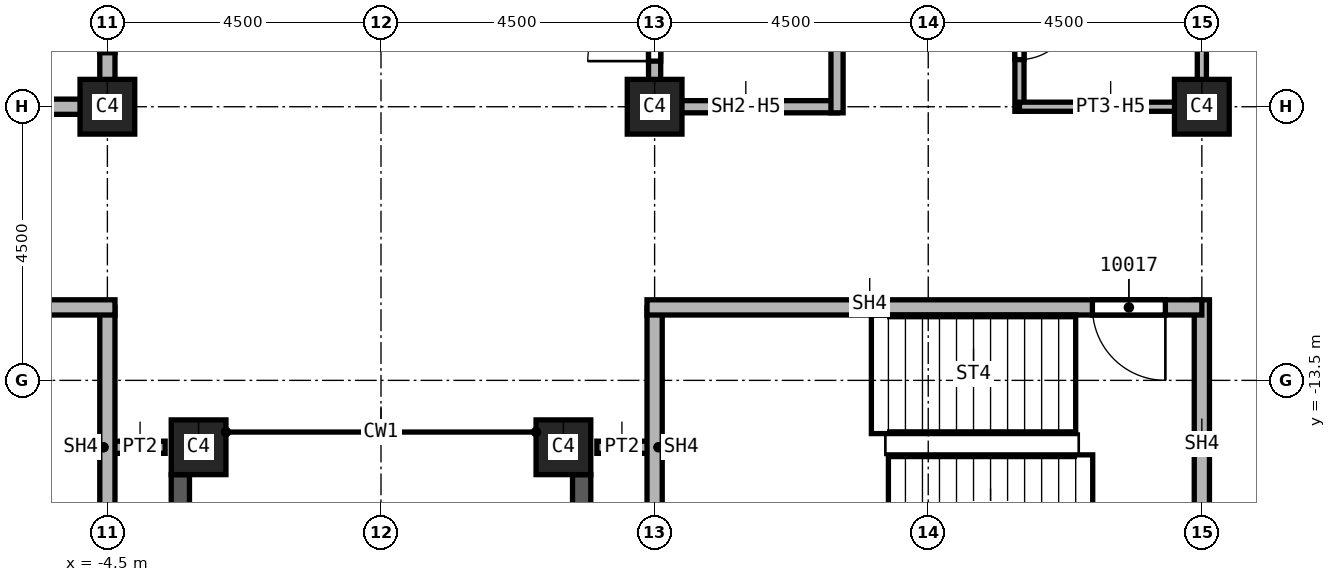
"""IFC4 building model, lengths in metres.
Left out: names, types, materials, properties, quantities, classifications, styles, units other than length and angle.
Written with IfcOpenShell. Run it as: python <this file> out.ifc"""

import sys

from ifc_helpers import new_model, si_unit, direction, frame, frame_2d, origin, origin_2d, place, context, subcontext, project, spatial, rectangle, extrude, element, fill, save


model = new_model("IFC4")
c1 = context("Model", 3, precision=1e-05, world=origin(), true_north=direction((0.0, 1.0)))
c2 = subcontext(c1, "Body", "Model", "MODEL_VIEW")
j1 = project(units=[si_unit("LENGTHUNIT", "METRE"), si_unit("PLANEANGLEUNIT", "RADIAN")], contexts=[c1])
p1 = place(None, origin())
s1 = spatial("IfcSite", under=j1, at=p1, CompositionType="ELEMENT")
p2 = place(p1, origin())
s2 = spatial("IfcBuilding", under=s1, at=p2, CompositionType="ELEMENT")
p3 = place(p2, frame((0.0, 0.0, 174.0)))
s3 = spatial("IfcBuildingStorey", under=s2, at=p3, CompositionType="ELEMENT", Elevation=174.0)
for number, where, z_axis, x_axis in (
    (1, (4.5, -9.0, 0.0), (0.0, 0.0, 1.0), (1.0, 0.0, 0.0)),
    (2, (13.5, -9.0, 0.0), (0.0, 0.0, 1.0), (1.0, 0.0, 0.0)),
    (3, (-4.5, -9.0, 0.0), (0.0, 0.0, 1.0), (1.0, 0.0, 0.0)),
    (4, (3.0, -14.6, 0.0), (0.0, 0.0, 1.0), (1.0, 0.0, 0.0)),
    (5, (-3.0, -14.6, 0.0), (0.0, 0.0, 1.0), (1.0, 0.0, 0.0)),
):
    element("IfcColumn", number, at=place(p3, frame(where, z_axis=z_axis, x_axis=x_axis)), inside=s3, PredefinedType="COLUMN", context=c2, shape_type="SweptSolid", body=[
        extrude(rectangle(XDim=0.9, YDim=0.9, at=origin_2d()), origin(), (0.0, 0.0, 1.0), 3.59),
    ])
p4 = place(p3, frame((-3.3, -23.05, 0.0), z_axis=(0.0, 0.0, 1.0), x_axis=(0.0, 1.0, 0.0)))
e6 = element("IfcWall", 6, at=p4, inside=s3, PredefinedType="SOLIDWALL", context=c2, shape_type="SweptSolid", body=[
    extrude(rectangle(XDim=8.0, YDim=0.3, at=frame_2d((4.0, 0.0))), origin(), (0.0, 0.0, 1.0), 2.99),
])
p5 = place(p4, frame((0.8, 0.0, 0.8)))
e7 = element("IfcOpeningElement", 7, at=p5, cuts=e6, PredefinedType="OPENING", context=c2, shape_type="SweptSolid", body=[
    extrude(rectangle(XDim=2.4, YDim=1.95, at=frame_2d((1.2, 0.975))), frame((0.0, 0.15, 0.0), z_axis=(0.0, -1.0, 0.0), x_axis=(1.0, 0.0, 0.0)), (0.0, 0.0, 1.0), 0.3),
])
p6 = place(p4, frame((4.8, 0.0, 0.8)))
e8 = element("IfcOpeningElement", 8, at=p6, cuts=e6, PredefinedType="OPENING", context=c2, shape_type="SweptSolid", body=[
    extrude(rectangle(XDim=2.4, YDim=1.95, at=frame_2d((1.2, 0.975))), frame((0.0, 0.15, 0.0), z_axis=(0.0, -1.0, 0.0), x_axis=(1.0, 0.0, 0.0)), (0.0, 0.0, 1.0), 0.3),
])
p7 = place(p3, frame((3.3, -15.05, 0.0), z_axis=(0.0, 0.0, 1.0), x_axis=(0.0, -1.0, 0.0)))
e9 = element("IfcWall", 9, at=p7, inside=s3, PredefinedType="SOLIDWALL", context=c2, shape_type="SweptSolid", body=[
    extrude(rectangle(XDim=8.0, YDim=0.3, at=frame_2d((4.0, 0.0))), origin(), (0.0, 0.0, 1.0), 2.99),
])
p8 = place(p7, frame((0.8, 0.0, 0.8)))
e10 = element("IfcOpeningElement", 10, at=p8, cuts=e9, PredefinedType="OPENING", context=c2, shape_type="SweptSolid", body=[
    extrude(rectangle(XDim=2.4, YDim=1.95, at=frame_2d((1.2, 0.975))), frame((0.0, 0.15, 0.0), z_axis=(0.0, -1.0, 0.0), x_axis=(1.0, 0.0, 0.0)), (0.0, 0.0, 1.0), 0.3),
])
p9 = place(p7, frame((4.8, 0.0, 0.8)))
e11 = element("IfcOpeningElement", 11, at=p9, cuts=e9, PredefinedType="OPENING", context=c2, shape_type="SweptSolid", body=[
    extrude(rectangle(XDim=2.4, YDim=1.95, at=frame_2d((1.2, 0.975))), frame((0.0, 0.15, 0.0), z_axis=(0.0, -1.0, 0.0), x_axis=(1.0, 0.0, 0.0)), (0.0, 0.0, 1.0), 0.3),
])
for number, where, z_axis, x_axis in (
    (12, (-3.55, -14.6, 0.0), (0.0, 0.0, 1.0), (-1.0, 0.0, 0.0)),
    (13, (4.5, -14.6, 0.0), (0.0, 0.0, 1.0), (-1.0, 0.0, 0.0)),
):
    element("IfcWall", number, at=place(p3, frame(where, z_axis=z_axis, x_axis=x_axis)), inside=s3, PredefinedType="PARTITIONING", context=c2, shape_type="SweptSolid", body=[
        extrude(rectangle(XDim=0.95, YDim=0.2, at=frame_2d((0.475, 0.0))), origin(), (0.0, 0.0, 1.0), 3.59),
    ])
p10 = place(p3, frame((4.5, -9.1, 0.0), z_axis=(0.0, 0.0, 1.0), x_axis=(0.0, 1.0, 0.0)))
e14 = element("IfcWall", 14, at=p10, inside=s3, PredefinedType="SOLIDWALL", context=c2, shape_type="SweptSolid", body=[
    extrude(rectangle(XDim=9.1, YDim=0.2, at=frame_2d((4.55, 0.0))), origin(), (0.0, 0.0, 1.0), 2.828),
])
p11 = place(p10, frame((0.85, 0.0, 0.0)))
e15 = element("IfcOpeningElement", 15, at=p11, cuts=e14, PredefinedType="OPENING", context=c2, shape_type="SweptSolid", body=[
    extrude(rectangle(XDim=1.1, YDim=2.1, at=frame_2d((0.55, 1.05))), frame((0.0, 0.1, 0.0), z_axis=(0.0, -1.0, 0.0), x_axis=(1.0, 0.0, 0.0)), (0.0, 0.0, 1.0), 0.2),
])
p12 = place(p10, frame((6.35, 0.0, 0.0)))
e16 = element("IfcOpeningElement", 16, at=p12, cuts=e14, PredefinedType="OPENING", context=c2, shape_type="SweptSolid", body=[
    extrude(rectangle(XDim=1.1, YDim=2.1, at=frame_2d((0.55, 1.05))), frame((0.0, 0.1, 0.0), z_axis=(0.0, -1.0, 0.0), x_axis=(1.0, 0.0, 0.0)), (0.0, 0.0, 1.0), 0.2),
])
p13 = place(p3, frame((7.5, -9.0, 0.0), z_axis=(0.0, 0.0, 1.0), x_axis=(-1.0, 0.0, 0.0)))
e17 = element("IfcWall", 17, at=p13, inside=s3, PredefinedType="SOLIDWALL", context=c2, shape_type="SweptSolid", body=[
    extrude(rectangle(XDim=3.0, YDim=0.2, at=frame_2d((1.5, 0.0))), origin(), (0.0, 0.0, 1.0), 2.828),
])
p14 = place(p3, frame((7.5, -2.875, 0.0), z_axis=(0.0, 0.0, 1.0), x_axis=(0.0, -1.0, 0.0)))
e18 = element("IfcWall", 18, at=p14, inside=s3, PredefinedType="SOLIDWALL", context=c2, shape_type="SweptSolid", body=[
    extrude(rectangle(XDim=6.225, YDim=0.2, at=frame_2d((3.113, 0.0))), origin(), (0.0, 0.0, 1.0), 3.59),
])
p15 = place(p3, frame((-4.5, -9.0, 0.0), z_axis=(0.0, 0.0, 1.0), x_axis=(-1.0, 0.0, 0.0)))
e19 = element("IfcWall", 19, at=p15, inside=s3, PredefinedType="SOLIDWALL", context=c2, shape_type="SweptSolid", body=[
    extrude(rectangle(XDim=3.0, YDim=0.25, at=frame_2d((1.5, 0.0))), origin(), (0.0, 0.0, 1.0), 2.828),
])
p16 = place(p3, frame((-4.5, 0.0, 0.0), z_axis=(0.0, 0.0, 1.0), x_axis=(0.0, -1.0, 0.0)))
e20 = element("IfcWall", 20, at=p16, inside=s3, PredefinedType="SOLIDWALL", context=c2, shape_type="SweptSolid", body=[
    extrude(rectangle(XDim=9.125, YDim=0.25, at=frame_2d((4.562, 0.0))), origin(), (0.0, 0.0, 1.0), 2.828),
])
p17 = place(p16, frame((7.012, 0.0, 0.0)))
e21 = element("IfcOpeningElement", 21, at=p17, cuts=e20, PredefinedType="OPENING", context=c2, shape_type="SweptSolid", body=[
    extrude(rectangle(XDim=1.1, YDim=2.1, at=frame_2d((0.55, 1.05))), frame((0.0, 0.125, 0.0), z_axis=(0.0, -1.0, 0.0), x_axis=(1.0, 0.0, 0.0)), (0.0, 0.0, 1.0), 0.25),
])
p18 = place(p16, frame((3.95, 0.0, 0.0)))
e22 = element("IfcOpeningElement", 22, at=p18, cuts=e20, PredefinedType="OPENING", context=c2, shape_type="SweptSolid", body=[
    extrude(rectangle(XDim=1.1, YDim=2.1, at=frame_2d((0.55, 1.05))), frame((0.0, 0.125, 0.0), z_axis=(0.0, -1.0, 0.0), x_axis=(1.0, 0.0, 0.0)), (0.0, 0.0, 1.0), 0.25),
])
p19 = place(p16, frame((0.95, 0.0, 0.0)))
e23 = element("IfcOpeningElement", 23, at=p19, cuts=e20, PredefinedType="OPENING", context=c2, shape_type="SweptSolid", body=[
    extrude(rectangle(XDim=1.1, YDim=2.1, at=frame_2d((0.55, 1.05))), frame((0.0, 0.125, 0.0), z_axis=(0.0, -1.0, 0.0), x_axis=(1.0, 0.0, 0.0)), (0.0, 0.0, 1.0), 0.25),
])
p20 = place(p3, frame((-4.5, -12.3, 0.0), z_axis=(0.0, 0.0, 1.0), x_axis=(0.0, -1.0, 0.0)))
e24 = element("IfcWall", 24, at=p20, inside=s3, PredefinedType="SOLIDWALL", context=c2, shape_type="SweptSolid", body=[
    extrude(rectangle(XDim=4.625, YDim=0.25, at=frame_2d((2.312, 0.0))), origin(), (0.0, 0.0, 1.0), 3.59),
])
p21 = place(p3, frame((-4.375, -12.3, 0.0), z_axis=(0.0, 0.0, 1.0), x_axis=(-1.0, 0.0, 0.0)))
e25 = element("IfcWall", 25, at=p21, inside=s3, PredefinedType="SOLIDWALL", context=c2, shape_type="SweptSolid", body=[
    extrude(rectangle(XDim=9.125, YDim=0.25, at=frame_2d((4.562, 0.0))), origin(), (0.0, 0.0, 1.0), 3.59),
])
p22 = place(p21, frame((7.2, 0.0, 0.0)))
e26 = element("IfcOpeningElement", 26, at=p22, cuts=e25, PredefinedType="OPENING", context=c2, shape_type="SweptSolid", body=[
    extrude(rectangle(XDim=1.2, YDim=2.1, at=frame_2d((0.6, 1.05))), frame((0.0, 0.125, 0.0), z_axis=(0.0, -1.0, 0.0), x_axis=(1.0, 0.0, 0.0)), (0.0, 0.0, 1.0), 0.25),
])
p23 = place(p3, frame((4.5, -16.8, 0.0), z_axis=(0.0, 0.0, 1.0), x_axis=(0.0, 1.0, 0.0)))
e27 = element("IfcWall", 27, at=p23, inside=s3, PredefinedType="SOLIDWALL", context=c2, shape_type="SweptSolid", body=[
    extrude(rectangle(XDim=4.5, YDim=0.25, at=frame_2d((2.25, 0.0))), origin(), (0.0, 0.0, 1.0), 3.59),
])
p24 = place(p3, frame((13.5, -16.925, 0.0), z_axis=(0.0, 0.0, 1.0), x_axis=(0.0, 1.0, 0.0)))
e28 = element("IfcWall", 28, at=p24, inside=s3, PredefinedType="SOLIDWALL", context=c2, shape_type="SweptSolid", body=[
    extrude(rectangle(XDim=4.75, YDim=0.25, at=frame_2d((2.375, 0.0))), origin(), (0.0, 0.0, 1.0), 3.59),
])
p25 = place(p3, frame((13.5, -12.3, 0.0), z_axis=(0.0, 0.0, 1.0), x_axis=(-1.0, 0.0, 0.0)))
e29 = element("IfcWall", 29, at=p25, inside=s3, PredefinedType="SOLIDWALL", context=c2, shape_type="SweptSolid", body=[
    extrude(rectangle(XDim=9.125, YDim=0.25, at=frame_2d((4.562, 0.0))), origin(), (0.0, 0.0, 1.0), 3.59),
])
p26 = place(p25, frame((0.6, 0.0, 0.0)))
e30 = element("IfcOpeningElement", 30, at=p26, cuts=e29, PredefinedType="OPENING", context=c2, shape_type="SweptSolid", body=[
    extrude(rectangle(XDim=1.2, YDim=2.1, at=frame_2d((0.6, 1.05))), frame((0.0, 0.125, 0.0), z_axis=(0.0, -1.0, 0.0), x_axis=(1.0, 0.0, 0.0)), (0.0, 0.0, 1.0), 0.25),
])
p27 = place(p3, frame((10.5, -2.875, 0.0), z_axis=(0.0, 0.0, 1.0), x_axis=(0.0, -1.0, 0.0)))
e31 = element("IfcWall", 31, at=p27, inside=s3, PredefinedType="PARTITIONING", context=c2, shape_type="SweptSolid", body=[
    extrude(rectangle(XDim=6.2, YDim=0.15, at=frame_2d((3.1, 0.0))), origin(), (0.0, 0.0, 1.0), 3.59),
])
p28 = place(p27, frame((4.45, 0.0, 0.0)))
e32 = element("IfcOpeningElement", 32, at=p28, cuts=e31, PredefinedType="OPENING", context=c2, shape_type="SweptSolid", body=[
    extrude(rectangle(XDim=0.9, YDim=2.1, at=frame_2d((0.45, 1.05))), frame((0.0, 0.075, 0.0), z_axis=(0.0, -1.0, 0.0), x_axis=(1.0, 0.0, 0.0)), (0.0, 0.0, 1.0), 0.15),
])
p29 = place(p3, frame((13.5, -9.0, 0.0), z_axis=(0.0, 0.0, 1.0), x_axis=(-1.0, 0.0, 0.0)))
e33 = element("IfcWall", 33, at=p29, inside=s3, PredefinedType="PARTITIONING", context=c2, shape_type="SweptSolid", body=[
    extrude(rectangle(XDim=3.0, YDim=0.15, at=frame_2d((1.5, 0.0))), origin(), (0.0, 0.0, 1.0), 2.828),
])
p30 = place(p3, frame((13.5, -3.0, 0.0), z_axis=(0.0, 0.0, 1.0), x_axis=(0.0, -1.0, 0.0)))
e34 = element("IfcWall", 34, at=p30, inside=s3, PredefinedType="PARTITIONING", context=c2, shape_type="SweptSolid", body=[
    extrude(rectangle(XDim=6.075, YDim=0.15, at=frame_2d((3.038, 0.0))), origin(), (0.0, 0.0, 1.0), 2.828),
])
p31 = place(p11, origin())
e35 = element("IfcDoor", 35, at=p31, inside=s3, OperationType="SINGLE_SWING_LEFT", PredefinedType="DOOR", context=c2, shape_type="SweptSolid", body=[
    extrude(rectangle(XDim=1.1, YDim=2.1, at=frame_2d((0.55, 1.05))), frame((0.0, 0.025, 0.0), z_axis=(0.0, -1.0, 0.0), x_axis=(1.0, 0.0, 0.0)), (0.0, 0.0, 1.0), 0.05),
])
fill(e15, e35)
p32 = place(p28, origin())
e36 = element("IfcDoor", 36, at=p32, inside=s3, OperationType="SINGLE_SWING_LEFT", PredefinedType="DOOR", context=c2, shape_type="SweptSolid", body=[
    extrude(rectangle(XDim=0.9, YDim=2.1, at=frame_2d((0.45, 1.05))), frame((0.0, 0.025, 0.0), z_axis=(0.0, -1.0, 0.0), x_axis=(1.0, 0.0, 0.0)), (0.0, 0.0, 1.0), 0.05),
])
fill(e32, e36)
p33 = place(p26, origin())
e37 = element("IfcDoor", 37, at=p33, inside=s3, OperationType="SINGLE_SWING_RIGHT", PredefinedType="DOOR", context=c2, shape_type="SweptSolid", body=[
    extrude(rectangle(XDim=1.2, YDim=2.1, at=frame_2d((0.6, 1.05))), frame((0.0, 0.025, 0.0), z_axis=(0.0, -1.0, 0.0), x_axis=(1.0, 0.0, 0.0)), (0.0, 0.0, 1.0), 0.05),
])
fill(e30, e37)
p34 = place(p17, origin())
e38 = element("IfcDoor", 38, at=p34, inside=s3, OperationType="SLIDING_TO_LEFT", PredefinedType="DOOR", context=c2, shape_type="SweptSolid", body=[
    extrude(rectangle(XDim=1.1, YDim=2.1, at=frame_2d((0.55, 1.05))), frame((0.0, 0.025, 0.0), z_axis=(0.0, -1.0, 0.0), x_axis=(1.0, 0.0, 0.0)), (0.0, 0.0, 1.0), 0.05),
])
fill(e21, e38)
save(model, sys.argv[1])
